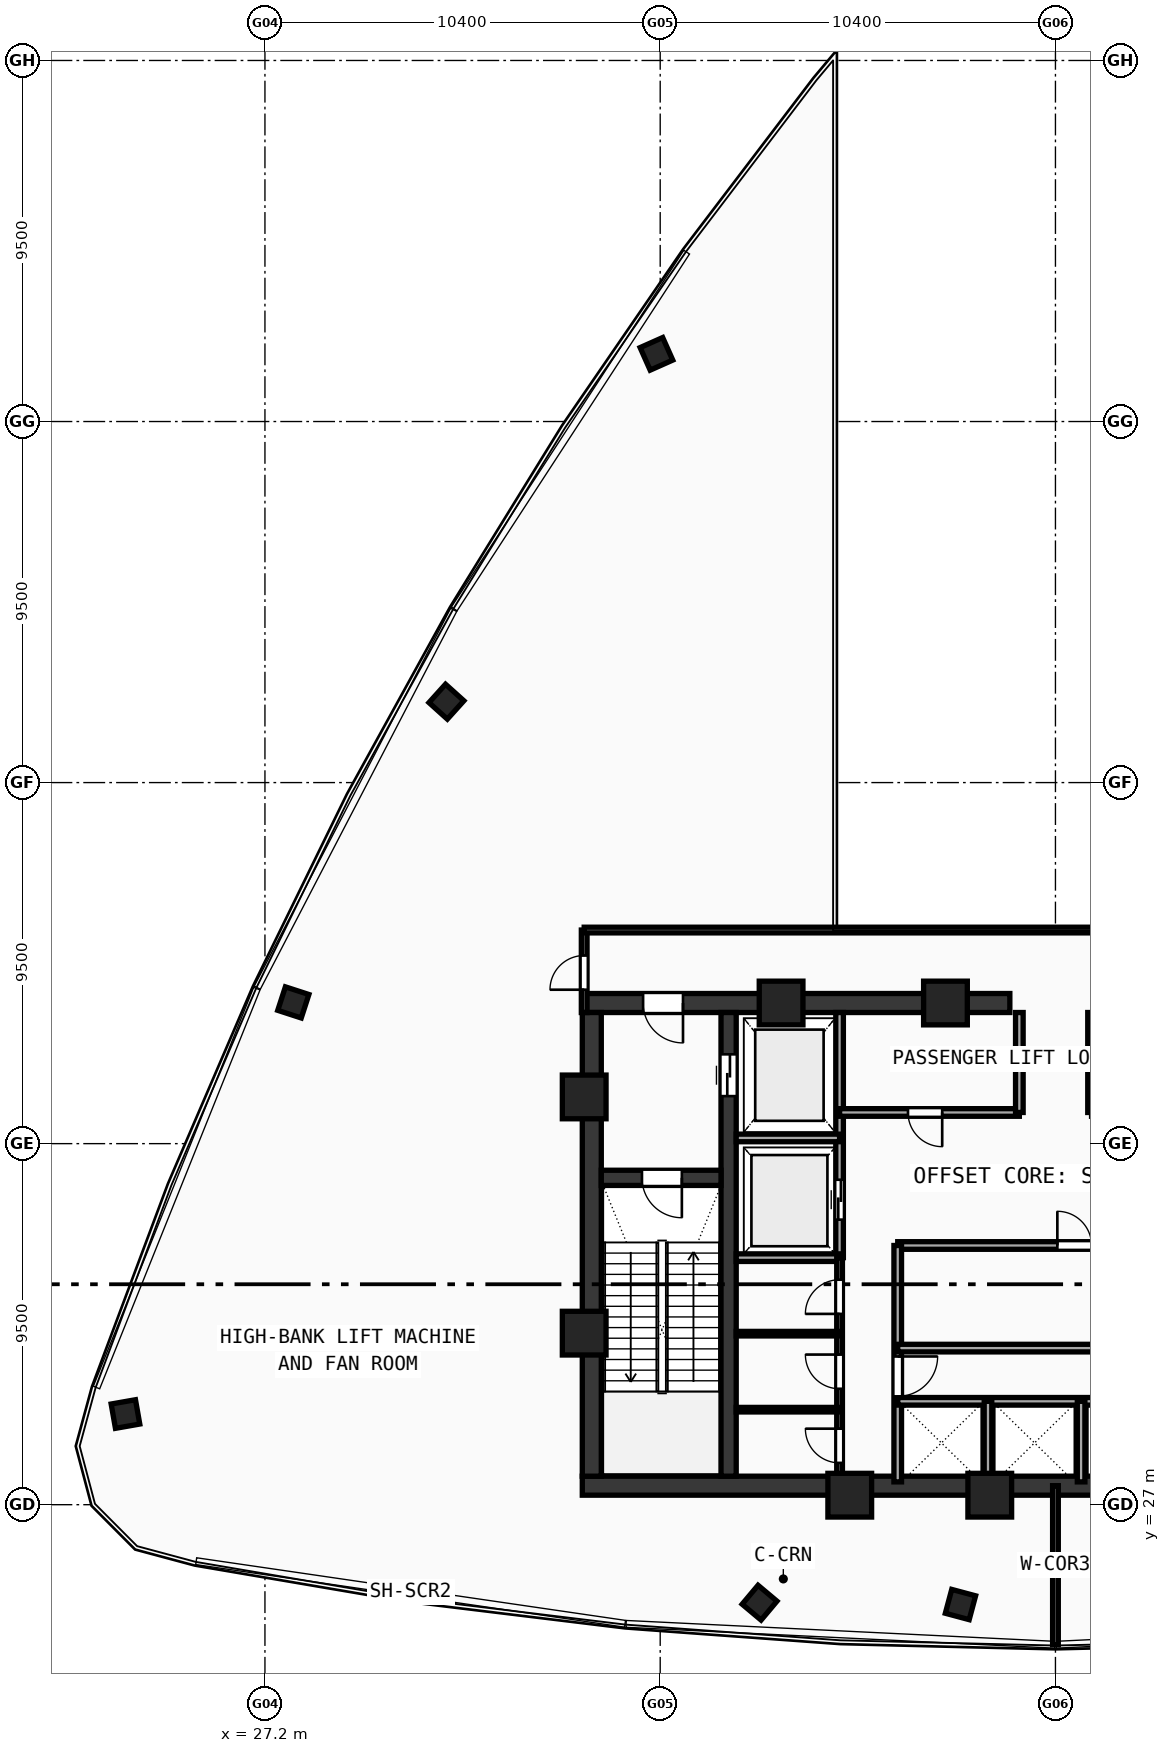
"""IFC4 building model, lengths in metres.
Left out: names, types, materials, properties, quantities, classifications, styles, units other than length and angle.
Written with IfcOpenShell. Run it as: python <this file> out.ifc"""

import sys

from ifc_helpers import new_model, si_unit, direction, frame, frame_2d, origin, origin_with_axes, origin_2d, place, context, subcontext, project, spatial, rectangle, hollow_rectangle, extrude, source, transform, mapped, element, fill, save


model = new_model("IFC4")
c1 = context("Model", 3, precision=1e-05, world=origin(), true_north=direction((0.0, 1.0)))
c2 = subcontext(c1, "Body", "Model", "MODEL_VIEW")
j1 = project(units=[si_unit("LENGTHUNIT", "METRE"), si_unit("PLANEANGLEUNIT", "RADIAN")], contexts=[c1])
p1 = place(None, origin())
s1 = spatial("IfcSite", under=j1, at=p1, CompositionType="ELEMENT")
p2 = place(p1, origin())
s2 = spatial("IfcBuilding", under=s1, at=p2, CompositionType="ELEMENT")
p3 = place(p2, frame((0.0, 0.0, 371.76)))
s3 = spatial("IfcBuildingStorey", under=s2, at=p3, CompositionType="ELEMENT", Elevation=371.76)
p4 = place(p3, frame((35.55, 27.5, 0.0), z_axis=(0.0, 0.0, 1.0), x_axis=(1.0, 0.0, 0.0)))
e1 = element("IfcWall", 1, at=p4, inside=s3, PredefinedType="SHEAR", context=c2, shape_type="SweptSolid", body=[
    extrude(rectangle(XDim=24.9, YDim=0.5, at=frame_2d((12.45, 0.0))), origin(), (0.0, 0.0, 1.0), 4.72),
])
p5 = place(p3, frame((35.55, 40.2, 0.0), z_axis=(0.0, 0.0, 1.0), x_axis=(1.0, 0.0, 0.0)))
e2 = element("IfcWall", 2, at=p5, inside=s3, PredefinedType="SHEAR", context=c2, shape_type="SweptSolid", body=[
    extrude(rectangle(XDim=11.25, YDim=0.5, at=frame_2d((5.625, 0.0))), origin(), (0.0, 0.0, 1.0), 4.72),
])
p6 = place(p5, frame((1.6, 0.0, 0.0)))
e3 = element("IfcOpeningElement", 3, at=p6, cuts=e2, PredefinedType="OPENING", context=c2, shape_type="SweptSolid", body=[
    extrude(rectangle(XDim=1.05, YDim=2.1, at=frame_2d((0.525, 1.05))), frame((0.0, 0.26, 0.0), z_axis=(0.0, -1.0, 0.0), x_axis=(1.0, 0.0, 0.0)), (0.0, 0.0, 1.0), 0.52),
])
p7 = place(p3, frame((35.8, 27.75, 0.0), z_axis=(0.0, 0.0, 1.0), x_axis=(0.0, 1.0, 0.0)))
e4 = element("IfcWall", 4, at=p7, inside=s3, PredefinedType="SHEAR", context=c2, shape_type="SweptSolid", body=[
    extrude(rectangle(XDim=12.2, YDim=0.5, at=frame_2d((6.1, 0.0))), origin(), (0.0, 0.0, 1.0), 4.72),
])
p8 = place(p3, frame((39.4, 27.75, 0.0), z_axis=(0.0, 0.0, 1.0), x_axis=(0.0, 1.0, 0.0)))
e5 = element("IfcWall", 5, at=p8, inside=s3, PredefinedType="SHEAR", context=c2, shape_type="SweptSolid", body=[
    extrude(rectangle(XDim=12.2, YDim=0.4, at=frame_2d((6.1, 0.0))), origin(), (0.0, 0.0, 1.0), 4.72),
])
p9 = place(p8, frame((10.0, 0.0, 0.0)))
e6 = element("IfcOpeningElement", 6, at=p9, cuts=e5, PredefinedType="OPENING", context=c2, shape_type="SweptSolid", body=[
    extrude(rectangle(XDim=1.1, YDim=2.1, at=frame_2d((0.55, 1.05))), frame((0.0, 0.21, 0.0), z_axis=(0.0, -1.0, 0.0), x_axis=(1.0, 0.0, 0.0)), (0.0, 0.0, 1.0), 0.42),
])
p10 = place(p3, frame((36.05, 35.6, 0.0), z_axis=(0.0, 0.0, 1.0), x_axis=(1.0, 0.0, 0.0)))
e7 = element("IfcWall", 7, at=p10, inside=s3, PredefinedType="SHEAR", context=c2, shape_type="SweptSolid", body=[
    extrude(rectangle(XDim=3.15, YDim=0.4, at=frame_2d((1.575, 0.0))), origin(), (0.0, 0.0, 1.0), 4.72),
])
p11 = place(p10, frame((1.07, 0.0, 0.0)))
e8 = element("IfcOpeningElement", 8, at=p11, cuts=e7, PredefinedType="OPENING", context=c2, shape_type="SweptSolid", body=[
    extrude(rectangle(XDim=1.05, YDim=2.1, at=frame_2d((0.525, 1.05))), frame((0.0, 0.21, 0.0), z_axis=(0.0, -1.0, 0.0), x_axis=(1.0, 0.0, 0.0)), (0.0, 0.0, 1.0), 0.42),
])
m1 = source(origin(), c2, "Body", "SweptSolid", [
    extrude(hollow_rectangle(XDim=1.15, YDim=1.15, WallThickness=0.048, at=origin_2d()), origin(), (0.0, 0.0, 1.0), 5.0),
])
for number, where, z_axis, x_axis in (
    (9, (42.588, 27.25, -0.28), (0.0, 0.0, 1.0), (1.0, 0.0, 0.0)),
    (10, (46.272, 27.25, -0.28), (0.0, 0.0, 1.0), (1.0, 0.0, 0.0)),
    (11, (45.106, 40.2, -0.28), (0.0, 0.0, 1.0), (1.0, 0.0, 0.0)),
    (12, (40.781, 40.2, -0.28), (0.0, 0.0, 1.0), (1.0, 0.0, 0.0)),
    (13, (35.6, 37.729, -0.28), (0.0, 0.0, 1.0), (1.0, 0.0, 0.0)),
    (14, (35.6, 31.513, -0.28), (0.0, 0.0, 1.0), (1.0, 0.0, 0.0)),
):
    element("IfcColumn", number, at=place(p3, frame(where, z_axis=z_axis, x_axis=x_axis)), inside=s3, PredefinedType="COLUMN", context=c2, shape_type="MappedRepresentation", body=[
        mapped(m1, transform((0.0, 0.0, 0.0), scale=1.0)),
    ])
m2 = source(origin(), c2, "Body", "SweptSolid", [
    extrude(hollow_rectangle(XDim=0.65, YDim=0.65, WallThickness=0.024, at=origin_2d()), origin(), (0.0, 0.0, 1.0), 5.0),
])
for number, where, z_axis, x_axis in (
    (15, (40.215, 24.422, -0.28), (0.0, 0.0, 1.0), (0.766, -0.643, 0.0)),
    (16, (45.501, 24.373, -0.28), (0.0, 0.0, 1.0), (0.966, -0.259, 0.0)),
    (17, (37.501, 57.281, -0.28), (0.0, 0.0, 1.0), (-0.914, -0.407, 0.0)),
    (18, (31.975, 48.129, -0.28), (0.0, 0.0, 1.0), (-0.669, -0.743, 0.0)),
    (19, (27.947, 40.216, -0.28), (0.0, 0.0, 1.0), (-0.309, -0.951, 0.0)),
    (20, (23.53, 29.385, -0.28), (0.0, 0.0, 1.0), (0.174, -0.985, 0.0)),
):
    element("IfcColumn", number, at=place(p3, frame(where, z_axis=z_axis, x_axis=x_axis)), inside=s3, PredefinedType="COLUMN", context=c2, shape_type="MappedRepresentation", body=[
        mapped(m2, transform((0.0, 0.0, 0.0), scale=1.0)),
    ])
p12 = place(p3, frame((42.32, 33.5, 0.0), z_axis=(0.0, 0.0, 1.0), x_axis=(0.0, 1.0, 0.0)))
e21 = element("IfcWall", 21, at=p12, inside=s3, PredefinedType="SOLIDWALL", context=c2, shape_type="SweptSolid", body=[
    extrude(rectangle(XDim=6.45, YDim=0.2, at=frame_2d((3.225, 0.0))), origin(), (0.0, 0.0, 1.0), 4.72),
])
p13 = place(p12, frame((1.0, 0.0, 0.0)))
e22 = element("IfcOpeningElement", 22, at=p13, cuts=e21, PredefinedType="OPENING", context=c2, shape_type="SweptSolid", body=[
    extrude(rectangle(XDim=1.05, YDim=2.1, at=frame_2d((0.525, 1.05))), frame((0.0, 0.11, 0.0), z_axis=(0.0, -1.0, 0.0), x_axis=(1.0, 0.0, 0.0)), (0.0, 0.0, 1.0), 0.22),
])
for number, where, z_axis, x_axis in (
    (23, (39.6, 36.65, 0.0), (0.0, 0.0, 1.0), (1.0, 0.0, 0.0)),
    (24, (39.6, 33.5, 0.0), (0.0, 0.0, 1.0), (1.0, 0.0, 0.0)),
):
    element("IfcWall", number, at=place(p3, frame(where, z_axis=z_axis, x_axis=x_axis)), inside=s3, PredefinedType="SOLIDWALL", context=c2, shape_type="SweptSolid", body=[
        extrude(rectangle(XDim=2.72, YDim=0.2, at=frame_2d((1.36, 0.0))), origin(), (0.0, 0.0, 1.0), 4.72),
    ])
p14 = place(p3, frame((42.32, 37.32, 0.0), z_axis=(0.0, 0.0, 1.0), x_axis=(1.0, 0.0, 0.0)))
e25 = element("IfcWall", 25, at=p14, inside=s3, PredefinedType="SOLIDWALL", context=c2, shape_type="SweptSolid", body=[
    extrude(rectangle(XDim=4.73, YDim=0.2, at=frame_2d((2.365, 0.0))), origin(), (0.0, 0.0, 1.0), 4.72),
])
p15 = place(p14, frame((1.8, 0.0, 0.0)))
e26 = element("IfcOpeningElement", 26, at=p15, cuts=e25, PredefinedType="OPENING", context=c2, shape_type="SweptSolid", body=[
    extrude(rectangle(XDim=0.9, YDim=2.1, at=frame_2d((0.45, 1.05))), frame((0.0, 0.11, 0.0), z_axis=(0.0, -1.0, 0.0), x_axis=(1.0, 0.0, 0.0)), (0.0, 0.0, 1.0), 0.22),
])
for number, where, z_axis, x_axis in (
    (27, (47.05, 37.32, 0.0), (0.0, 0.0, 1.0), (0.0, 1.0, 0.0)),
    (28, (48.95, 37.32, 0.0), (0.0, 0.0, 1.0), (0.0, 1.0, 0.0)),
):
    element("IfcWall", number, at=place(p3, frame(where, z_axis=z_axis, x_axis=x_axis)), inside=s3, PredefinedType="SOLIDWALL", context=c2, shape_type="SweptSolid", body=[
        extrude(rectangle(XDim=2.63, YDim=0.2, at=frame_2d((1.315, 0.0))), origin(), (0.0, 0.0, 1.0), 4.72),
    ])
p16 = place(p3, frame((43.85, 33.82, 0.0), z_axis=(0.0, 0.0, 1.0), x_axis=(1.0, 0.0, 0.0)))
e29 = element("IfcWall", 29, at=p16, inside=s3, PredefinedType="SOLIDWALL", context=c2, shape_type="SweptSolid", body=[
    extrude(rectangle(XDim=9.83, YDim=0.2, at=frame_2d((4.915, 0.0))), origin(), (0.0, 0.0, 1.0), 4.72),
])
p17 = place(p16, frame((4.2, 0.0, 0.0)))
e30 = element("IfcOpeningElement", 30, at=p17, cuts=e29, PredefinedType="OPENING", context=c2, shape_type="SweptSolid", body=[
    extrude(rectangle(XDim=0.9, YDim=2.1, at=frame_2d((0.45, 1.05))), frame((0.0, 0.11, 0.0), z_axis=(0.0, -1.0, 0.0), x_axis=(1.0, 0.0, 0.0)), (0.0, 0.0, 1.0), 0.22),
])
p18 = place(p3, frame((43.85, 27.6, 0.0), z_axis=(0.0, 0.0, 1.0), x_axis=(0.0, 1.0, 0.0)))
e31 = element("IfcWall", 31, at=p18, inside=s3, PredefinedType="SOLIDWALL", context=c2, shape_type="SweptSolid", body=[
    extrude(rectangle(XDim=6.22, YDim=0.2, at=frame_2d((3.11, 0.0))), origin(), (0.0, 0.0, 1.0), 4.72),
])
p19 = place(p18, frame((2.25, 0.0, 0.0)))
e32 = element("IfcOpeningElement", 32, at=p19, cuts=e31, PredefinedType="OPENING", context=c2, shape_type="SweptSolid", body=[
    extrude(rectangle(XDim=1.05, YDim=2.1, at=frame_2d((0.525, 1.05))), frame((0.0, 0.11, 0.0), z_axis=(0.0, -1.0, 0.0), x_axis=(1.0, 0.0, 0.0)), (0.0, 0.0, 1.0), 0.22),
])
p20 = place(p3, frame((43.85, 29.72, 0.0), z_axis=(0.0, 0.0, 1.0), x_axis=(1.0, 0.0, 0.0)))
e33 = element("IfcWall", 33, at=p20, inside=s3, PredefinedType="SOLIDWALL", context=c2, shape_type="SweptSolid", body=[
    extrude(rectangle(XDim=7.2, YDim=0.2, at=frame_2d((3.6, 0.0))), origin(), (0.0, 0.0, 1.0), 4.72),
])
p21 = place(p3, frame((43.85, 31.12, 0.0), z_axis=(0.0, 0.0, 1.0), x_axis=(1.0, 0.0, 0.0)))
e34 = element("IfcWall", 34, at=p21, inside=s3, PredefinedType="SOLIDWALL", context=c2, shape_type="SweptSolid", body=[
    extrude(rectangle(XDim=9.83, YDim=0.2, at=frame_2d((4.915, 0.0))), origin(), (0.0, 0.0, 1.0), 4.72),
])
for number, where, z_axis, x_axis in (
    (35, (46.225, 27.6, 0.0), (0.0, 0.0, 1.0), (0.0, 1.0, 0.0)),
    (36, (48.675, 27.6, 0.0), (0.0, 0.0, 1.0), (0.0, 1.0, 0.0)),
):
    element("IfcWall", number, at=place(p3, frame(where, z_axis=z_axis, x_axis=x_axis)), inside=s3, PredefinedType="SOLIDWALL", context=c2, shape_type="SweptSolid", body=[
        extrude(rectangle(XDim=2.12, YDim=0.2, at=frame_2d((1.06, 0.0))), origin(), (0.0, 0.0, 1.0), 4.72),
    ])
p22 = place(p3, frame((42.32, 27.6, 0.0), z_axis=(0.0, 0.0, 1.0), x_axis=(0.0, 1.0, 0.0)))
e37 = element("IfcWall", 37, at=p22, inside=s3, PredefinedType="PARTITIONING", context=c2, shape_type="SweptSolid", body=[
    extrude(rectangle(XDim=5.9, YDim=0.15, at=frame_2d((2.95, 0.0))), origin(), (0.0, 0.0, 1.0), 4.72),
])
p23 = place(p22, frame((0.5, 0.0, 0.0)))
e38 = element("IfcOpeningElement", 38, at=p23, cuts=e37, PredefinedType="OPENING", context=c2, shape_type="SweptSolid", body=[
    extrude(rectangle(XDim=0.9, YDim=2.1, at=frame_2d((0.45, 1.05))), frame((0.0, 0.085, 0.0), z_axis=(0.0, -1.0, 0.0), x_axis=(1.0, 0.0, 0.0)), (0.0, 0.0, 1.0), 0.17),
])
p24 = place(p22, frame((2.45, 0.0, 0.0)))
e39 = element("IfcOpeningElement", 39, at=p24, cuts=e37, PredefinedType="OPENING", context=c2, shape_type="SweptSolid", body=[
    extrude(rectangle(XDim=0.9, YDim=2.1, at=frame_2d((0.45, 1.05))), frame((0.0, 0.085, 0.0), z_axis=(0.0, -1.0, 0.0), x_axis=(1.0, 0.0, 0.0)), (0.0, 0.0, 1.0), 0.17),
])
p25 = place(p22, frame((4.42, 0.0, 0.0)))
e40 = element("IfcOpeningElement", 40, at=p25, cuts=e37, PredefinedType="OPENING", context=c2, shape_type="SweptSolid", body=[
    extrude(rectangle(XDim=0.9, YDim=2.1, at=frame_2d((0.45, 1.05))), frame((0.0, 0.085, 0.0), z_axis=(0.0, -1.0, 0.0), x_axis=(1.0, 0.0, 0.0)), (0.0, 0.0, 1.0), 0.17),
])
for number, where, z_axis, x_axis in (
    (41, (39.6, 29.5, 0.0), (0.0, 0.0, 1.0), (1.0, 0.0, 0.0)),
    (42, (39.6, 31.5, 0.0), (0.0, 0.0, 1.0), (1.0, 0.0, 0.0)),
):
    element("IfcWall", number, at=place(p3, frame(where, z_axis=z_axis, x_axis=x_axis)), inside=s3, PredefinedType="PARTITIONING", context=c2, shape_type="SweptSolid", body=[
        extrude(rectangle(XDim=2.72, YDim=0.12, at=frame_2d((1.36, 0.0))), origin(), (0.0, 0.0, 1.0), 4.72),
    ])
p26 = place(p3, frame((35.6, 39.95, 0.0), z_axis=(0.0, 0.0, 1.0), x_axis=(0.0, 1.0, 0.0)))
e43 = element("IfcWall", 43, at=p26, inside=s3, PredefinedType="PARTITIONING", context=c2, shape_type="SweptSolid", body=[
    extrude(rectangle(XDim=2.17, YDim=0.15, at=frame_2d((1.085, 0.0))), origin(), (0.0, 0.0, 1.0), 4.37),
])
p27 = place(p26, frame((0.6, 0.0, 0.0)))
e44 = element("IfcOpeningElement", 44, at=p27, cuts=e43, PredefinedType="OPENING", context=c2, shape_type="SweptSolid", body=[
    extrude(rectangle(XDim=0.9, YDim=2.1, at=frame_2d((0.45, 1.05))), frame((0.0, 0.085, 0.0), z_axis=(0.0, -1.0, 0.0), x_axis=(1.0, 0.0, 0.0)), (0.0, 0.0, 1.0), 0.17),
])
p28 = place(p3, frame((48.0, 23.314, 0.0), z_axis=(0.0, 0.0, 1.0), x_axis=(0.0, 1.0, 0.0)))
e45 = element("IfcWall", 45, at=p28, inside=s3, PredefinedType="PARTITIONING", context=c2, shape_type="SweptSolid", body=[
    extrude(rectangle(XDim=4.186, YDim=0.15, at=frame_2d((2.093, 0.0))), origin(), (0.0, 0.0, 1.0), 4.12),
])
p29 = place(p3, frame((35.6, 42.12, 0.0), z_axis=(0.0, 0.0, 1.0), x_axis=(1.0, 0.0, 0.0)))
e46 = element("IfcWall", 46, at=p29, inside=s3, PredefinedType="PARTITIONING", context=c2, shape_type="SweptSolid", body=[
    extrude(rectangle(XDim=26.65, YDim=0.15, at=frame_2d((13.325, 0.0))), origin(), (0.0, 0.0, 1.0), 4.12),
])
m3 = source(origin(), c2, "Body", "SweptSolid", [
    extrude(rectangle(XDim=1.05, YDim=2.1, at=frame_2d((0.525, 1.05))), frame((0.0, 0.025, 0.0), z_axis=(0.0, -1.0, 0.0), x_axis=(1.0, 0.0, 0.0)), (0.0, 0.0, 1.0), 0.05),
])
p30 = place(p11, frame((1.05, 0.0, 0.0), z_axis=(0.0, 0.0, 1.0), x_axis=(-1.0, 0.0, 0.0)))
e47 = element("IfcDoor", 47, at=p30, inside=s3, OperationType="SINGLE_SWING_LEFT", PredefinedType="DOOR", context=c2, shape_type="MappedRepresentation", body=[
    mapped(m3, transform((0.0, 0.0, 0.0), scale=1.0)),
])
fill(e8, e47)
p31 = place(p6, frame((1.05, 0.0, 0.0), z_axis=(0.0, 0.0, 1.0), x_axis=(-1.0, 0.0, 0.0)))
e48 = element("IfcDoor", 48, at=p31, inside=s3, OperationType="SINGLE_SWING_LEFT", PredefinedType="DOOR", context=c2, shape_type="MappedRepresentation", body=[
    mapped(m3, transform((0.0, 0.0, 0.0), scale=1.0)),
])
fill(e3, e48)
m4 = source(origin(), c2, "Body", "SweptSolid", [
    extrude(rectangle(XDim=1.1, YDim=2.1, at=frame_2d((0.55, 1.05))), frame((0.0, 0.025, 0.0), z_axis=(0.0, -1.0, 0.0), x_axis=(1.0, 0.0, 0.0)), (0.0, 0.0, 1.0), 0.05),
])
p32 = place(p9, frame((1.1, 0.0, 0.0), z_axis=(0.0, 0.0, 1.0), x_axis=(-1.0, 0.0, 0.0)))
e49 = element("IfcDoor", 49, at=p32, inside=s3, OperationType="DOUBLE_DOOR_SLIDING", PredefinedType="DOOR", context=c2, shape_type="MappedRepresentation", body=[
    mapped(m4, transform((0.0, 0.0, 0.0), scale=1.0)),
])
fill(e6, e49)
p33 = place(p13, origin_with_axes())
e50 = element("IfcDoor", 50, at=p33, inside=s3, OperationType="DOUBLE_DOOR_SLIDING", PredefinedType="DOOR", context=c2, shape_type="MappedRepresentation", body=[
    mapped(m3, transform((0.0, 0.0, 0.0), scale=1.0)),
])
fill(e22, e50)
m5 = source(origin(), c2, "Body", "SweptSolid", [
    extrude(rectangle(XDim=0.9, YDim=2.1, at=frame_2d((0.45, 1.05))), frame((0.0, 0.025, 0.0), z_axis=(0.0, -1.0, 0.0), x_axis=(1.0, 0.0, 0.0)), (0.0, 0.0, 1.0), 0.05),
])
p34 = place(p15, frame((0.9, 0.0, 0.0), z_axis=(0.0, 0.0, 1.0), x_axis=(-1.0, 0.0, 0.0)))
e51 = element("IfcDoor", 51, at=p34, inside=s3, OperationType="SINGLE_SWING_LEFT", PredefinedType="DOOR", context=c2, shape_type="MappedRepresentation", body=[
    mapped(m5, transform((0.0, 0.0, 0.0), scale=1.0)),
])
fill(e26, e51)
p35 = place(p17, origin_with_axes())
e52 = element("IfcDoor", 52, at=p35, inside=s3, OperationType="SINGLE_SWING_LEFT", PredefinedType="DOOR", context=c2, shape_type="MappedRepresentation", body=[
    mapped(m5, transform((0.0, 0.0, 0.0), scale=1.0)),
])
fill(e30, e52)
p36 = place(p19, frame((1.05, 0.0, 0.0), z_axis=(0.0, 0.0, 1.0), x_axis=(-1.0, 0.0, 0.0)))
e53 = element("IfcDoor", 53, at=p36, inside=s3, OperationType="SINGLE_SWING_LEFT", PredefinedType="DOOR", context=c2, shape_type="MappedRepresentation", body=[
    mapped(m3, transform((0.0, 0.0, 0.0), scale=1.0)),
])
fill(e32, e53)
p37 = place(p23, origin_with_axes())
e54 = element("IfcDoor", 54, at=p37, inside=s3, OperationType="SINGLE_SWING_RIGHT", PredefinedType="DOOR", context=c2, shape_type="MappedRepresentation", body=[
    mapped(m5, transform((0.0, 0.0, 0.0), scale=1.0)),
])
fill(e38, e54)
p38 = place(p24, origin_with_axes())
e55 = element("IfcDoor", 55, at=p38, inside=s3, OperationType="SINGLE_SWING_RIGHT", PredefinedType="DOOR", context=c2, shape_type="MappedRepresentation", body=[
    mapped(m5, transform((0.0, 0.0, 0.0), scale=1.0)),
])
fill(e39, e55)
p39 = place(p25, origin_with_axes())
e56 = element("IfcDoor", 56, at=p39, inside=s3, OperationType="SINGLE_SWING_LEFT", PredefinedType="DOOR", context=c2, shape_type="MappedRepresentation", body=[
    mapped(m5, transform((0.0, 0.0, 0.0), scale=1.0)),
])
fill(e40, e56)
p40 = place(p27, origin_with_axes())
e57 = element("IfcDoor", 57, at=p40, inside=s3, OperationType="SINGLE_SWING_LEFT", PredefinedType="DOOR", context=c2, shape_type="MappedRepresentation", body=[
    mapped(m5, transform((0.0, 0.0, 0.0), scale=1.0)),
])
fill(e44, e57)
save(model, sys.argv[1])
